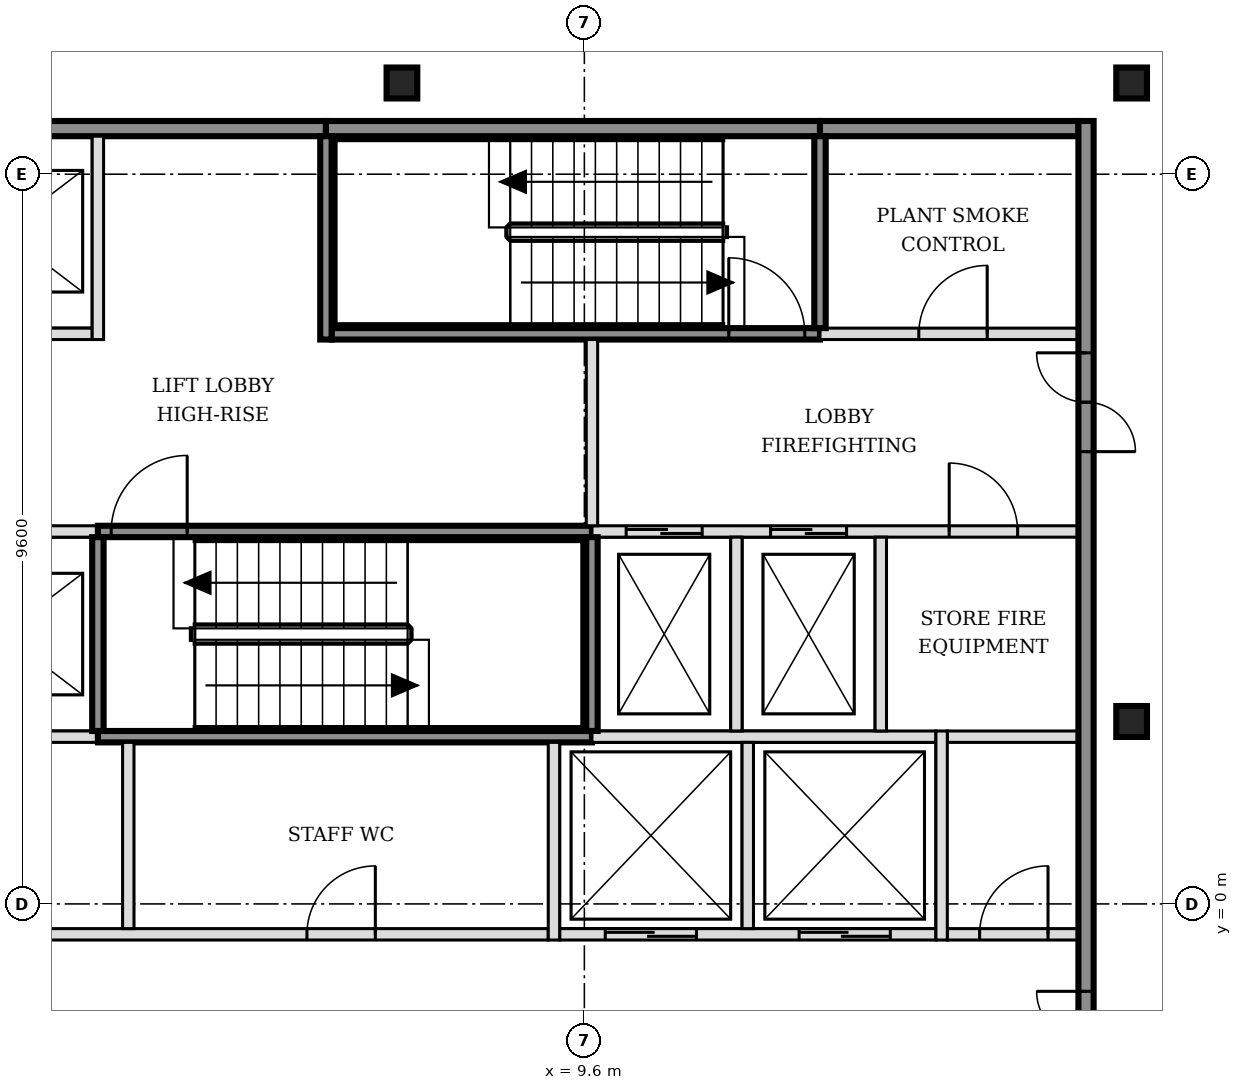
"""IFC4 building model, lengths in metres.
Left out: names, types, materials, properties, quantities, classifications, styles, units other than length and angle.
Written with IfcOpenShell. Run it as: python <this file> out.ifc"""

import sys

from ifc_helpers import new_model, si_unit, direction, frame, frame_2d, origin, origin_2d, place, context, subcontext, project, spatial, rectangle, i_section, extrude, element, fill, save


model = new_model("IFC4")
c1 = context("Model", 3, precision=1e-05, world=origin(), true_north=direction((0.0, 1.0)))
c2 = subcontext(c1, "Body", "Model", "MODEL_VIEW")
j1 = project(units=[si_unit("LENGTHUNIT", "METRE"), si_unit("PLANEANGLEUNIT", "RADIAN")], contexts=[c1])
p1 = place(None, origin())
s1 = spatial("IfcSite", under=j1, at=p1, CompositionType="ELEMENT")
p2 = place(p1, origin())
s2 = spatial("IfcBuilding", under=s1, at=p2, CompositionType="ELEMENT")
p3 = place(p2, frame((0.0, 0.0, 210.6)))
s3 = spatial("IfcBuildingStorey", under=s2, at=p3, CompositionType="ELEMENT", Elevation=210.6)
for number, where, z_axis, x_axis in (
    (1, (16.8, 2.4, -0.15), (0.0, 0.0, 1.0), (1.0, 0.0, 0.0)),
    (2, (7.2, 10.8, -0.15), (0.0, 0.0, 1.0), (1.0, 0.0, 0.0)),
    (3, (16.8, 10.8, -0.15), (0.0, 0.0, 1.0), (1.0, 0.0, 0.0)),
):
    element("IfcColumn", number, at=place(p3, frame(where, z_axis=z_axis, x_axis=x_axis)), inside=s3, PredefinedType="COLUMN", context=c2, shape_type="SweptSolid", body=[
        extrude(i_section(OverallWidth=0.404, OverallDepth=0.407, WebThickness=0.027, FlangeThickness=0.044, FilletRadius=0.015, at=origin_2d()), origin(), (0.0, 0.0, 1.0), 3.6),
    ])
p4 = place(p3, frame((-1.7, -0.4, 0.0), z_axis=(0.0, 0.0, 1.0), x_axis=(1.0, 0.0, 0.0)))
e4 = element("IfcWall", 4, at=p4, inside=s3, PredefinedType="PARTITIONING", context=c2, shape_type="SweptSolid", body=[
    extrude(rectangle(XDim=10.825, YDim=0.15, at=frame_2d((5.413, 0.0))), origin(), (0.0, 0.0, 1.0), 3.45),
])
p5 = place(p4, frame((2.15, 0.0, 0.0)))
e5 = element("IfcOpeningElement", 5, at=p5, cuts=e4, PredefinedType="OPENING", context=c2, shape_type="SweptSolid", body=[
    extrude(rectangle(XDim=0.9, YDim=2.1, at=frame_2d((0.45, 1.05))), frame((0.0, 0.085, 0.0), z_axis=(0.0, -1.0, 0.0), x_axis=(1.0, 0.0, 0.0)), (0.0, 0.0, 1.0), 0.17),
])
p6 = place(p4, frame((7.65, 0.0, 0.0)))
e6 = element("IfcOpeningElement", 6, at=p6, cuts=e4, PredefinedType="OPENING", context=c2, shape_type="SweptSolid", body=[
    extrude(rectangle(XDim=0.9, YDim=2.1, at=frame_2d((0.45, 1.05))), frame((0.0, 0.085, 0.0), z_axis=(0.0, -1.0, 0.0), x_axis=(1.0, 0.0, 0.0)), (0.0, 0.0, 1.0), 0.17),
])
p7 = place(p3, frame((9.275, -0.4, 0.0), z_axis=(0.0, 0.0, 1.0), x_axis=(1.0, 0.0, 0.0)))
e7 = element("IfcWall", 7, at=p7, inside=s3, PredefinedType="SOLIDWALL", context=c2, shape_type="SweptSolid", body=[
    extrude(rectangle(XDim=4.95, YDim=0.15, at=frame_2d((2.475, 0.0))), origin(), (0.0, 0.0, 1.0), 3.45),
])
p8 = place(p7, frame((0.6, 0.0, 0.0)))
e8 = element("IfcOpeningElement", 8, at=p8, cuts=e7, PredefinedType="OPENING", context=c2, shape_type="SweptSolid", body=[
    extrude(rectangle(XDim=1.2, YDim=2.1, at=frame_2d((0.6, 1.05))), frame((0.0, 0.085, 0.0), z_axis=(0.0, -1.0, 0.0), x_axis=(1.0, 0.0, 0.0)), (0.0, 0.0, 1.0), 0.17),
])
p9 = place(p7, frame((3.15, 0.0, 0.0)))
e9 = element("IfcOpeningElement", 9, at=p9, cuts=e7, PredefinedType="OPENING", context=c2, shape_type="SweptSolid", body=[
    extrude(rectangle(XDim=1.2, YDim=2.1, at=frame_2d((0.6, 1.05))), frame((0.0, 0.085, 0.0), z_axis=(0.0, -1.0, 0.0), x_axis=(1.0, 0.0, 0.0)), (0.0, 0.0, 1.0), 0.17),
])
p10 = place(p3, frame((14.375, -0.4, 0.0), z_axis=(0.0, 0.0, 1.0), x_axis=(1.0, 0.0, 0.0)))
e10 = element("IfcWall", 10, at=p10, inside=s3, PredefinedType="PARTITIONING", context=c2, shape_type="SweptSolid", body=[
    extrude(rectangle(XDim=1.725, YDim=0.15, at=frame_2d((0.863, 0.0))), origin(), (0.0, 0.0, 1.0), 3.45),
])
p11 = place(p10, frame((0.425, 0.0, 0.0)))
e11 = element("IfcOpeningElement", 11, at=p11, cuts=e10, PredefinedType="OPENING", context=c2, shape_type="SweptSolid", body=[
    extrude(rectangle(XDim=0.9, YDim=2.1, at=frame_2d((0.45, 1.05))), frame((0.0, 0.085, 0.0), z_axis=(0.0, -1.0, 0.0), x_axis=(1.0, 0.0, 0.0)), (0.0, 0.0, 1.0), 0.17),
])
p12 = place(p3, frame((-1.7, 2.2, 0.0), z_axis=(0.0, 0.0, 1.0), x_axis=(1.0, 0.0, 0.0)))
e12 = element("IfcWall", 12, at=p12, inside=s3, PredefinedType="SOLIDWALL", context=c2, shape_type="SweptSolid", body=[
    extrude(rectangle(XDim=4.9, YDim=0.15, at=frame_2d((2.45, 0.0))), origin(), (0.0, 0.0, 1.0), 3.45),
])
p13 = place(p3, frame((3.2, 2.2, 0.0), z_axis=(0.0, 0.0, 1.0), x_axis=(1.0, 0.0, 0.0)))
e13 = element("IfcWall", 13, at=p13, inside=s3, PredefinedType="SOLIDWALL", context=c2, shape_type="SweptSolid", body=[
    extrude(rectangle(XDim=6.5, YDim=0.15, at=frame_2d((3.25, 0.0))), origin(), (0.0, 0.0, 1.0), 3.45),
])
p14 = place(p3, frame((9.7, 2.2, 0.0), z_axis=(0.0, 0.0, 1.0), x_axis=(1.0, 0.0, 0.0)))
e14 = element("IfcWall", 14, at=p14, inside=s3, PredefinedType="SOLIDWALL", context=c2, shape_type="SweptSolid", body=[
    extrude(rectangle(XDim=4.525, YDim=0.15, at=frame_2d((2.263, 0.0))), origin(), (0.0, 0.0, 1.0), 3.45),
])
p15 = place(p3, frame((14.375, 2.2, 0.0), z_axis=(0.0, 0.0, 1.0), x_axis=(1.0, 0.0, 0.0)))
e15 = element("IfcWall", 15, at=p15, inside=s3, PredefinedType="PARTITIONING", context=c2, shape_type="SweptSolid", body=[
    extrude(rectangle(XDim=1.725, YDim=0.15, at=frame_2d((0.863, 0.0))), origin(), (0.0, 0.0, 1.0), 3.45),
])
p16 = place(p3, frame((-1.7, 4.9, 0.0), z_axis=(0.0, 0.0, 1.0), x_axis=(1.0, 0.0, 0.0)))
e16 = element("IfcWall", 16, at=p16, inside=s3, PredefinedType="SOLIDWALL", context=c2, shape_type="SweptSolid", body=[
    extrude(rectangle(XDim=4.9, YDim=0.15, at=frame_2d((2.45, 0.0))), origin(), (0.0, 0.0, 1.0), 3.45),
])
p17 = place(p16, frame((0.6, 0.0, 0.0)))
e17 = element("IfcOpeningElement", 17, at=p17, cuts=e16, PredefinedType="OPENING", context=c2, shape_type="SweptSolid", body=[
    extrude(rectangle(XDim=1.1, YDim=2.1, at=frame_2d((0.55, 1.05))), frame((0.0, 0.085, 0.0), z_axis=(0.0, -1.0, 0.0), x_axis=(1.0, 0.0, 0.0)), (0.0, 0.0, 1.0), 0.17),
])
p18 = place(p16, frame((3.1, 0.0, 0.0)))
e18 = element("IfcOpeningElement", 18, at=p18, cuts=e16, PredefinedType="OPENING", context=c2, shape_type="SweptSolid", body=[
    extrude(rectangle(XDim=1.1, YDim=2.1, at=frame_2d((0.55, 1.05))), frame((0.0, 0.085, 0.0), z_axis=(0.0, -1.0, 0.0), x_axis=(1.0, 0.0, 0.0)), (0.0, 0.0, 1.0), 0.17),
])
p19 = place(p3, frame((3.2, 4.9, 0.0), z_axis=(0.0, 0.0, 1.0), x_axis=(1.0, 0.0, 0.0)))
e19 = element("IfcWall", 19, at=p19, inside=s3, PredefinedType="SOLIDWALL", context=c2, shape_type="SweptSolid", body=[
    extrude(rectangle(XDim=6.5, YDim=0.15, at=frame_2d((3.25, 0.0))), origin(), (0.0, 0.0, 1.0), 3.45),
])
p20 = place(p19, frame((0.175, 0.0, 0.0)))
e20 = element("IfcOpeningElement", 20, at=p20, cuts=e19, PredefinedType="OPENING", context=c2, shape_type="SweptSolid", body=[
    extrude(rectangle(XDim=1.0, YDim=2.1, at=frame_2d((0.5, 1.05))), frame((0.0, 0.085, 0.0), z_axis=(0.0, -1.0, 0.0), x_axis=(1.0, 0.0, 0.0)), (0.0, 0.0, 1.0), 0.17),
])
p21 = place(p3, frame((9.7, 4.9, 0.0), z_axis=(0.0, 0.0, 1.0), x_axis=(1.0, 0.0, 0.0)))
e21 = element("IfcWall", 21, at=p21, inside=s3, PredefinedType="SOLIDWALL", context=c2, shape_type="SweptSolid", body=[
    extrude(rectangle(XDim=6.4, YDim=0.15, at=frame_2d((3.2, 0.0))), origin(), (0.0, 0.0, 1.0), 3.45),
])
p22 = place(p21, frame((0.45, 0.0, 0.0)))
e22 = element("IfcOpeningElement", 22, at=p22, cuts=e21, PredefinedType="OPENING", context=c2, shape_type="SweptSolid", body=[
    extrude(rectangle(XDim=1.0, YDim=2.1, at=frame_2d((0.5, 1.05))), frame((0.0, 0.085, 0.0), z_axis=(0.0, -1.0, 0.0), x_axis=(1.0, 0.0, 0.0)), (0.0, 0.0, 1.0), 0.17),
])
p23 = place(p21, frame((2.35, 0.0, 0.0)))
e23 = element("IfcOpeningElement", 23, at=p23, cuts=e21, PredefinedType="OPENING", context=c2, shape_type="SweptSolid", body=[
    extrude(rectangle(XDim=1.0, YDim=2.1, at=frame_2d((0.5, 1.05))), frame((0.0, 0.085, 0.0), z_axis=(0.0, -1.0, 0.0), x_axis=(1.0, 0.0, 0.0)), (0.0, 0.0, 1.0), 0.17),
])
p24 = place(p21, frame((4.7, 0.0, 0.0)))
e24 = element("IfcOpeningElement", 24, at=p24, cuts=e21, PredefinedType="OPENING", context=c2, shape_type="SweptSolid", body=[
    extrude(rectangle(XDim=0.9, YDim=2.1, at=frame_2d((0.45, 1.05))), frame((0.0, 0.085, 0.0), z_axis=(0.0, -1.0, 0.0), x_axis=(1.0, 0.0, 0.0)), (0.0, 0.0, 1.0), 0.17),
])
p25 = place(p3, frame((-1.7, 7.5, 0.0), z_axis=(0.0, 0.0, 1.0), x_axis=(1.0, 0.0, 0.0)))
e25 = element("IfcWall", 25, at=p25, inside=s3, PredefinedType="SOLIDWALL", context=c2, shape_type="SweptSolid", body=[
    extrude(rectangle(XDim=4.825, YDim=0.15, at=frame_2d((2.413, 0.0))), origin(), (0.0, 0.0, 1.0), 3.45),
])
p26 = place(p25, frame((0.6, 0.0, 0.0)))
e26 = element("IfcOpeningElement", 26, at=p26, cuts=e25, PredefinedType="OPENING", context=c2, shape_type="SweptSolid", body=[
    extrude(rectangle(XDim=1.1, YDim=2.1, at=frame_2d((0.55, 1.05))), frame((0.0, 0.085, 0.0), z_axis=(0.0, -1.0, 0.0), x_axis=(1.0, 0.0, 0.0)), (0.0, 0.0, 1.0), 0.17),
])
p27 = place(p25, frame((3.1, 0.0, 0.0)))
e27 = element("IfcOpeningElement", 27, at=p27, cuts=e25, PredefinedType="OPENING", context=c2, shape_type="SweptSolid", body=[
    extrude(rectangle(XDim=1.1, YDim=2.1, at=frame_2d((0.55, 1.05))), frame((0.0, 0.085, 0.0), z_axis=(0.0, -1.0, 0.0), x_axis=(1.0, 0.0, 0.0)), (0.0, 0.0, 1.0), 0.17),
])
p28 = place(p3, frame((6.275, 7.5, 0.0), z_axis=(0.0, 0.0, 1.0), x_axis=(1.0, 0.0, 0.0)))
e28 = element("IfcWall", 28, at=p28, inside=s3, PredefinedType="SOLIDWALL", context=c2, shape_type="SweptSolid", body=[
    extrude(rectangle(XDim=6.425, YDim=0.15, at=frame_2d((3.212, 0.0))), origin(), (0.0, 0.0, 1.0), 3.45),
])
p29 = place(p28, frame((5.225, 0.0, 0.0)))
e29 = element("IfcOpeningElement", 29, at=p29, cuts=e28, PredefinedType="OPENING", context=c2, shape_type="SweptSolid", body=[
    extrude(rectangle(XDim=1.0, YDim=2.1, at=frame_2d((0.5, 1.05))), frame((0.0, 0.085, 0.0), z_axis=(0.0, -1.0, 0.0), x_axis=(1.0, 0.0, 0.0)), (0.0, 0.0, 1.0), 0.17),
])
p30 = place(p3, frame((12.7, 7.5, 0.0), z_axis=(0.0, 0.0, 1.0), x_axis=(1.0, 0.0, 0.0)))
e30 = element("IfcWall", 30, at=p30, inside=s3, PredefinedType="SOLIDWALL", context=c2, shape_type="SweptSolid", body=[
    extrude(rectangle(XDim=3.4, YDim=0.15, at=frame_2d((1.7, 0.0))), origin(), (0.0, 0.0, 1.0), 3.45),
])
p31 = place(p30, frame((1.3, 0.0, 0.0)))
e31 = element("IfcOpeningElement", 31, at=p31, cuts=e30, PredefinedType="OPENING", context=c2, shape_type="SweptSolid", body=[
    extrude(rectangle(XDim=0.9, YDim=2.1, at=frame_2d((0.45, 1.05))), frame((0.0, 0.085, 0.0), z_axis=(0.0, -1.0, 0.0), x_axis=(1.0, 0.0, 0.0)), (0.0, 0.0, 1.0), 0.17),
])
p32 = place(p3, frame((-1.7, 10.2, 0.0), z_axis=(0.0, 0.0, 1.0), x_axis=(1.0, 0.0, 0.0)))
e32 = element("IfcWall", 32, at=p32, inside=s3, PredefinedType="SOLIDWALL", context=c2, shape_type="SweptSolid", body=[
    extrude(rectangle(XDim=7.9, YDim=0.2, at=frame_2d((3.95, 0.0))), origin(), (0.0, 0.0, 1.0), 3.45),
])
p33 = place(p3, frame((6.2, 10.2, 0.0), z_axis=(0.0, 0.0, 1.0), x_axis=(1.0, 0.0, 0.0)))
e33 = element("IfcWall", 33, at=p33, inside=s3, PredefinedType="SOLIDWALL", context=c2, shape_type="SweptSolid", body=[
    extrude(rectangle(XDim=6.5, YDim=0.2, at=frame_2d((3.25, 0.0))), origin(), (0.0, 0.0, 1.0), 3.45),
])
p34 = place(p3, frame((12.7, 10.2, 0.0), z_axis=(0.0, 0.0, 1.0), x_axis=(1.0, 0.0, 0.0)))
e34 = element("IfcWall", 34, at=p34, inside=s3, PredefinedType="SOLIDWALL", context=c2, shape_type="SweptSolid", body=[
    extrude(rectangle(XDim=3.4, YDim=0.2, at=frame_2d((1.7, 0.0))), origin(), (0.0, 0.0, 1.0), 3.45),
])
p35 = place(p3, frame((3.2, 2.275, 0.0), z_axis=(0.0, 0.0, 1.0), x_axis=(0.0, 1.0, 0.0)))
e35 = element("IfcWall", 35, at=p35, inside=s3, PredefinedType="SOLIDWALL", context=c2, shape_type="SweptSolid", body=[
    extrude(rectangle(XDim=2.55, YDim=0.15, at=frame_2d((1.275, 0.0))), origin(), (0.0, 0.0, 1.0), 3.45),
])
p36 = place(p3, frame((3.2, 7.425, 0.0), z_axis=(0.0, 0.0, 1.0), x_axis=(0.0, 1.0, 0.0)))
e36 = element("IfcWall", 36, at=p36, inside=s3, PredefinedType="SOLIDWALL", context=c2, shape_type="SweptSolid", body=[
    extrude(rectangle(XDim=2.675, YDim=0.15, at=frame_2d((1.337, 0.0))), origin(), (0.0, 0.0, 1.0), 3.45),
])
p37 = place(p3, frame((3.6, -0.325, 0.0), z_axis=(0.0, 0.0, 1.0), x_axis=(0.0, 1.0, 0.0)))
e37 = element("IfcWall", 37, at=p37, inside=s3, PredefinedType="PARTITIONING", context=c2, shape_type="SweptSolid", body=[
    extrude(rectangle(XDim=2.45, YDim=0.15, at=frame_2d((1.225, 0.0))), origin(), (0.0, 0.0, 1.0), 3.45),
])
p38 = place(p3, frame((6.2, 7.425, 0.0), z_axis=(0.0, 0.0, 1.0), x_axis=(0.0, 1.0, 0.0)))
e38 = element("IfcWall", 38, at=p38, inside=s3, PredefinedType="SOLIDWALL", context=c2, shape_type="SweptSolid", body=[
    extrude(rectangle(XDim=2.675, YDim=0.15, at=frame_2d((1.337, 0.0))), origin(), (0.0, 0.0, 1.0), 3.45),
])
p39 = place(p3, frame((9.2, -0.475, 0.0), z_axis=(0.0, 0.0, 1.0), x_axis=(0.0, 1.0, 0.0)))
e39 = element("IfcWall", 39, at=p39, inside=s3, PredefinedType="SOLIDWALL", context=c2, shape_type="SweptSolid", body=[
    extrude(rectangle(XDim=2.6, YDim=0.15, at=frame_2d((1.3, 0.0))), origin(), (0.0, 0.0, 1.0), 3.45),
])
p40 = place(p3, frame((9.7, 2.275, 0.0), z_axis=(0.0, 0.0, 1.0), x_axis=(0.0, 1.0, 0.0)))
e40 = element("IfcWall", 40, at=p40, inside=s3, PredefinedType="SOLIDWALL", context=c2, shape_type="SweptSolid", body=[
    extrude(rectangle(XDim=2.55, YDim=0.15, at=frame_2d((1.275, 0.0))), origin(), (0.0, 0.0, 1.0), 3.45),
])
p41 = place(p3, frame((9.7, 4.975, 0.0), z_axis=(0.0, 0.0, 1.0), x_axis=(0.0, 1.0, 0.0)))
e41 = element("IfcWall", 41, at=p41, inside=s3, PredefinedType="SOLIDWALL", context=c2, shape_type="SweptSolid", body=[
    extrude(rectangle(XDim=2.45, YDim=0.15, at=frame_2d((1.225, 0.0))), origin(), (0.0, 0.0, 1.0), 3.45),
])
p42 = place(p3, frame((11.6, 2.275, 0.0), z_axis=(0.0, 0.0, 1.0), x_axis=(0.0, 1.0, 0.0)))
e42 = element("IfcWall", 42, at=p42, inside=s3, PredefinedType="SOLIDWALL", context=c2, shape_type="SweptSolid", body=[
    extrude(rectangle(XDim=2.55, YDim=0.15, at=frame_2d((1.275, 0.0))), origin(), (0.0, 0.0, 1.0), 3.45),
])
p43 = place(p3, frame((11.75, -0.325, 0.0), z_axis=(0.0, 0.0, 1.0), x_axis=(0.0, 1.0, 0.0)))
e43 = element("IfcWall", 43, at=p43, inside=s3, PredefinedType="SOLIDWALL", context=c2, shape_type="SweptSolid", body=[
    extrude(rectangle(XDim=2.45, YDim=0.15, at=frame_2d((1.225, 0.0))), origin(), (0.0, 0.0, 1.0), 3.45),
])
p44 = place(p3, frame((12.7, 7.575, 0.0), z_axis=(0.0, 0.0, 1.0), x_axis=(0.0, 1.0, 0.0)))
e44 = element("IfcWall", 44, at=p44, inside=s3, PredefinedType="SOLIDWALL", context=c2, shape_type="SweptSolid", body=[
    extrude(rectangle(XDim=2.525, YDim=0.15, at=frame_2d((1.263, 0.0))), origin(), (0.0, 0.0, 1.0), 3.45),
])
p45 = place(p3, frame((13.5, 2.275, 0.0), z_axis=(0.0, 0.0, 1.0), x_axis=(0.0, 1.0, 0.0)))
e45 = element("IfcWall", 45, at=p45, inside=s3, PredefinedType="SOLIDWALL", context=c2, shape_type="SweptSolid", body=[
    extrude(rectangle(XDim=2.55, YDim=0.15, at=frame_2d((1.275, 0.0))), origin(), (0.0, 0.0, 1.0), 3.45),
])
p46 = place(p3, frame((14.3, -0.475, 0.0), z_axis=(0.0, 0.0, 1.0), x_axis=(0.0, 1.0, 0.0)))
e46 = element("IfcWall", 46, at=p46, inside=s3, PredefinedType="SOLIDWALL", context=c2, shape_type="SweptSolid", body=[
    extrude(rectangle(XDim=2.75, YDim=0.15, at=frame_2d((1.375, 0.0))), origin(), (0.0, 0.0, 1.0), 3.45),
])
p47 = place(p3, frame((16.2, -5.5, 0.0), z_axis=(0.0, 0.0, 1.0), x_axis=(0.0, 1.0, 0.0)))
e47 = element("IfcWall", 47, at=p47, inside=s3, PredefinedType="SOLIDWALL", context=c2, shape_type="SweptSolid", body=[
    extrude(rectangle(XDim=15.8, YDim=0.2, at=frame_2d((7.9, 0.0))), origin(), (0.0, 0.0, 1.0), 3.45),
])
p48 = place(p47, frame((3.05, 0.0, 0.0)))
e48 = element("IfcOpeningElement", 48, at=p48, cuts=e47, PredefinedType="OPENING", context=c2, shape_type="SweptSolid", body=[
    extrude(rectangle(XDim=1.3, YDim=2.1, at=frame_2d((0.65, 1.05))), frame((0.0, 0.11, 0.0), z_axis=(0.0, -1.0, 0.0), x_axis=(1.0, 0.0, 0.0)), (0.0, 0.0, 1.0), 0.22),
])
p49 = place(p47, frame((11.45, 0.0, 0.0)))
e49 = element("IfcOpeningElement", 49, at=p49, cuts=e47, PredefinedType="OPENING", context=c2, shape_type="SweptSolid", body=[
    extrude(rectangle(XDim=1.3, YDim=2.1, at=frame_2d((0.65, 1.05))), frame((0.0, 0.11, 0.0), z_axis=(0.0, -1.0, 0.0), x_axis=(1.0, 0.0, 0.0)), (0.0, 0.0, 1.0), 0.22),
])
p50 = place(p8, origin())
e50 = element("IfcDoor", 50, at=p50, inside=s3, OperationType="DOUBLE_DOOR_SLIDING", PredefinedType="DOOR", context=c2, shape_type="SweptSolid", body=[
    extrude(rectangle(XDim=1.2, YDim=2.1, at=frame_2d((0.6, 1.05))), frame((0.0, 0.025, 0.0), z_axis=(0.0, -1.0, 0.0), x_axis=(1.0, 0.0, 0.0)), (0.0, 0.0, 1.0), 0.05),
])
fill(e8, e50)
p51 = place(p9, origin())
e51 = element("IfcDoor", 51, at=p51, inside=s3, OperationType="DOUBLE_DOOR_SLIDING", PredefinedType="DOOR", context=c2, shape_type="SweptSolid", body=[
    extrude(rectangle(XDim=1.2, YDim=2.1, at=frame_2d((0.6, 1.05))), frame((0.0, 0.025, 0.0), z_axis=(0.0, -1.0, 0.0), x_axis=(1.0, 0.0, 0.0)), (0.0, 0.0, 1.0), 0.05),
])
fill(e9, e51)
p52 = place(p22, origin())
e52 = element("IfcDoor", 52, at=p52, inside=s3, OperationType="DOUBLE_DOOR_SLIDING", PredefinedType="DOOR", context=c2, shape_type="SweptSolid", body=[
    extrude(rectangle(XDim=1.0, YDim=2.1, at=frame_2d((0.5, 1.05))), frame((0.0, 0.025, 0.0), z_axis=(0.0, -1.0, 0.0), x_axis=(1.0, 0.0, 0.0)), (0.0, 0.0, 1.0), 0.05),
])
fill(e22, e52)
p53 = place(p23, origin())
e53 = element("IfcDoor", 53, at=p53, inside=s3, OperationType="DOUBLE_DOOR_SLIDING", PredefinedType="DOOR", context=c2, shape_type="SweptSolid", body=[
    extrude(rectangle(XDim=1.0, YDim=2.1, at=frame_2d((0.5, 1.05))), frame((0.0, 0.025, 0.0), z_axis=(0.0, -1.0, 0.0), x_axis=(1.0, 0.0, 0.0)), (0.0, 0.0, 1.0), 0.05),
])
fill(e23, e53)
p54 = place(p20, origin())
e54 = element("IfcDoor", 54, at=p54, inside=s3, OperationType="SINGLE_SWING_RIGHT", PredefinedType="DOOR", context=c2, shape_type="SweptSolid", body=[
    extrude(rectangle(XDim=1.0, YDim=2.1, at=frame_2d((0.5, 1.05))), frame((0.0, 0.025, 0.0), z_axis=(0.0, -1.0, 0.0), x_axis=(1.0, 0.0, 0.0)), (0.0, 0.0, 1.0), 0.05),
])
fill(e20, e54)
p55 = place(p29, origin())
e55 = element("IfcDoor", 55, at=p55, inside=s3, OperationType="SINGLE_SWING_LEFT", PredefinedType="DOOR", context=c2, shape_type="SweptSolid", body=[
    extrude(rectangle(XDim=1.0, YDim=2.1, at=frame_2d((0.5, 1.05))), frame((0.0, 0.025, 0.0), z_axis=(0.0, -1.0, 0.0), x_axis=(1.0, 0.0, 0.0)), (0.0, 0.0, 1.0), 0.05),
])
fill(e29, e55)
p56 = place(p48, origin())
e56 = element("IfcDoor", 56, at=p56, inside=s3, OperationType="DOUBLE_DOOR_SINGLE_SWING", PredefinedType="DOOR", context=c2, shape_type="SweptSolid", body=[
    extrude(rectangle(XDim=1.3, YDim=2.1, at=frame_2d((0.65, 1.05))), frame((0.0, 0.025, 0.0), z_axis=(0.0, -1.0, 0.0), x_axis=(1.0, 0.0, 0.0)), (0.0, 0.0, 1.0), 0.05),
])
fill(e48, e56)
p57 = place(p49, origin())
e57 = element("IfcDoor", 57, at=p57, inside=s3, OperationType="DOUBLE_DOOR_SINGLE_SWING", PredefinedType="DOOR", context=c2, shape_type="SweptSolid", body=[
    extrude(rectangle(XDim=1.3, YDim=2.1, at=frame_2d((0.65, 1.05))), frame((0.0, 0.025, 0.0), z_axis=(0.0, -1.0, 0.0), x_axis=(1.0, 0.0, 0.0)), (0.0, 0.0, 1.0), 0.05),
])
fill(e49, e57)
p58 = place(p11, origin())
e58 = element("IfcDoor", 58, at=p58, inside=s3, OperationType="SINGLE_SWING_RIGHT", PredefinedType="DOOR", context=c2, shape_type="SweptSolid", body=[
    extrude(rectangle(XDim=0.9, YDim=2.1, at=frame_2d((0.45, 1.05))), frame((0.0, 0.025, 0.0), z_axis=(0.0, -1.0, 0.0), x_axis=(1.0, 0.0, 0.0)), (0.0, 0.0, 1.0), 0.05),
])
fill(e11, e58)
p59 = place(p24, origin())
e59 = element("IfcDoor", 59, at=p59, inside=s3, OperationType="SINGLE_SWING_LEFT", PredefinedType="DOOR", context=c2, shape_type="SweptSolid", body=[
    extrude(rectangle(XDim=0.9, YDim=2.1, at=frame_2d((0.45, 1.05))), frame((0.0, 0.025, 0.0), z_axis=(0.0, -1.0, 0.0), x_axis=(1.0, 0.0, 0.0)), (0.0, 0.0, 1.0), 0.05),
])
fill(e24, e59)
p60 = place(p31, origin())
e60 = element("IfcDoor", 60, at=p60, inside=s3, OperationType="SINGLE_SWING_RIGHT", PredefinedType="DOOR", context=c2, shape_type="SweptSolid", body=[
    extrude(rectangle(XDim=0.9, YDim=2.1, at=frame_2d((0.45, 1.05))), frame((0.0, 0.025, 0.0), z_axis=(0.0, -1.0, 0.0), x_axis=(1.0, 0.0, 0.0)), (0.0, 0.0, 1.0), 0.05),
])
fill(e31, e60)
p61 = place(p6, origin())
e61 = element("IfcDoor", 61, at=p61, inside=s3, OperationType="SINGLE_SWING_RIGHT", PredefinedType="DOOR", context=c2, shape_type="SweptSolid", body=[
    extrude(rectangle(XDim=0.9, YDim=2.1, at=frame_2d((0.45, 1.05))), frame((0.0, 0.025, 0.0), z_axis=(0.0, -1.0, 0.0), x_axis=(1.0, 0.0, 0.0)), (0.0, 0.0, 1.0), 0.05),
])
fill(e6, e61)
save(model, sys.argv[1])
